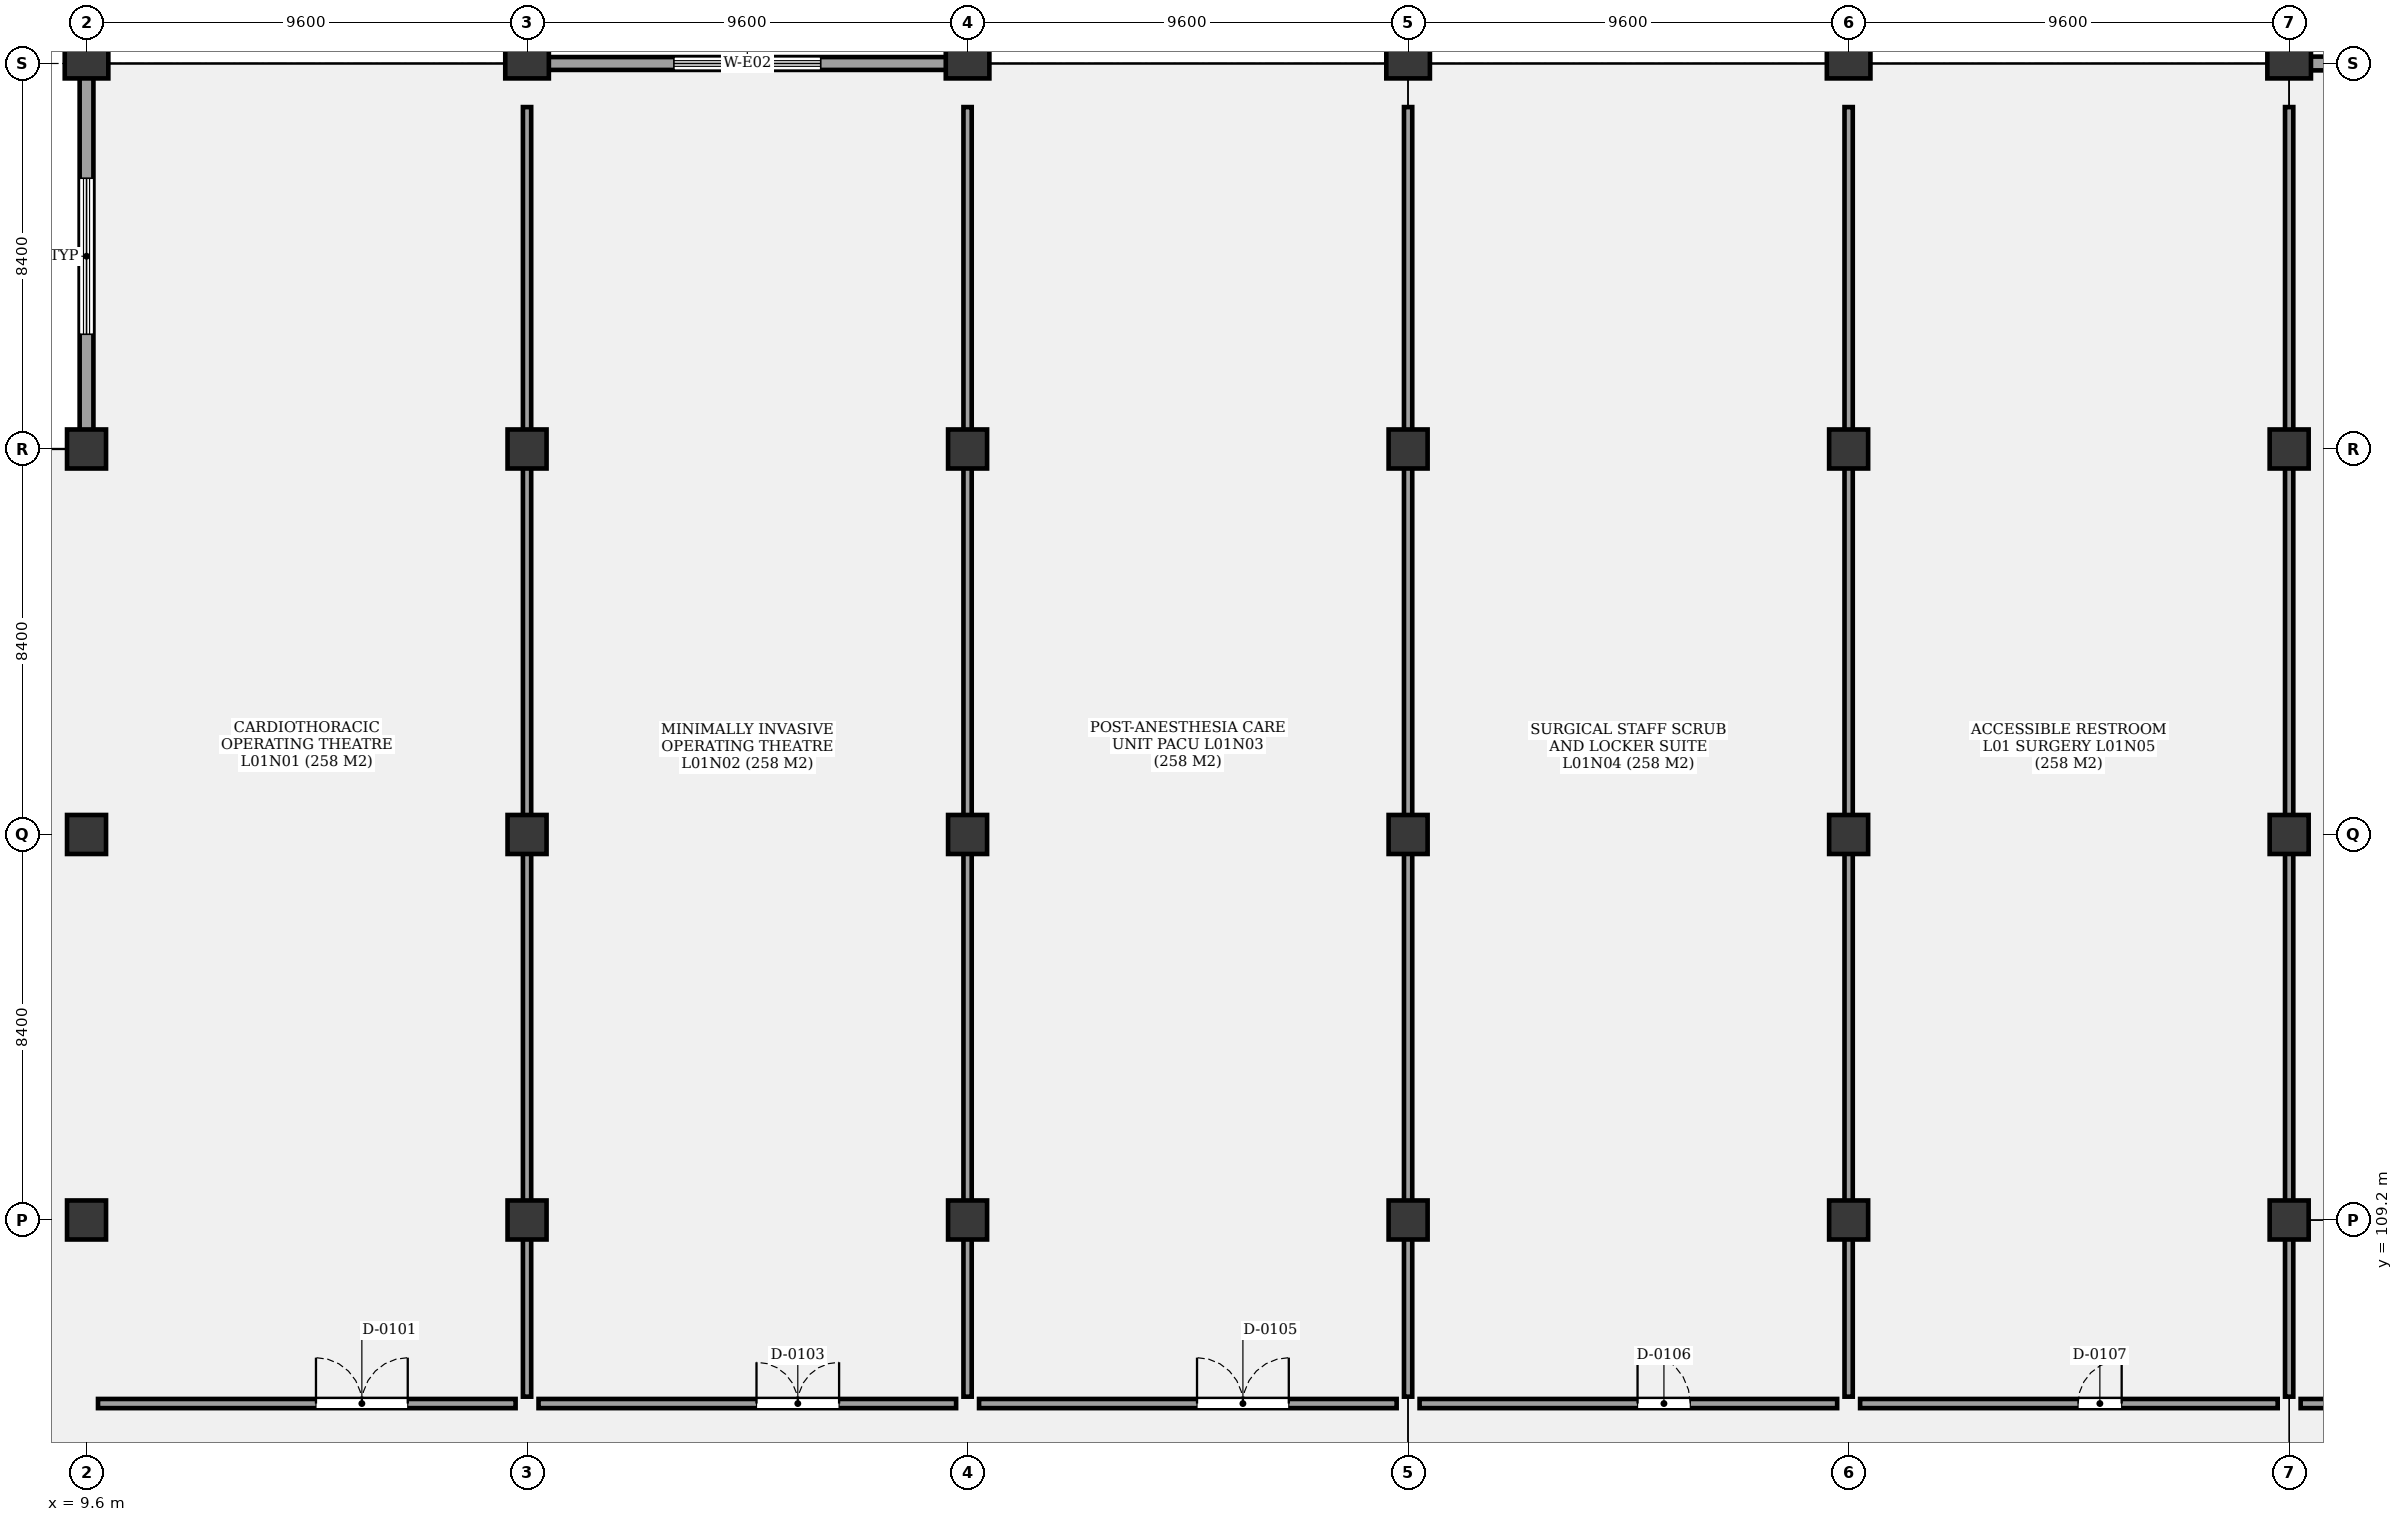
"""IFC4 building model, lengths in metres.
Left out: names, types, materials, properties, quantities, classifications, styles, units other than length and angle.
Written with IfcOpenShell. Run it as: python <this file> out.ifc"""

import sys

from ifc_helpers import new_model, si_unit, direction, frame, frame_2d, origin, origin_2d, place, context, subcontext, project, spatial, rectangle, extrude, element, fill, save


model = new_model("IFC4")
c1 = context("Model", 3, precision=1e-05, world=origin(), true_north=direction((0.0, 1.0)))
c2 = subcontext(c1, "Body", "Model", "MODEL_VIEW")
j1 = project(units=[si_unit("LENGTHUNIT", "METRE"), si_unit("PLANEANGLEUNIT", "RADIAN")], contexts=[c1])
p1 = place(None, origin())
s1 = spatial("IfcSite", under=j1, at=p1, CompositionType="ELEMENT")
p2 = place(p1, origin())
s2 = spatial("IfcBuilding", under=s1, at=p2, CompositionType="ELEMENT")
p3 = place(p2, frame((0.0, 0.0, 5.1)))
s3 = spatial("IfcBuildingStorey", under=s2, at=p3, CompositionType="ELEMENT", Elevation=5.1)
for number, where, z_axis, x_axis in (
    (1, (9.6, 109.2, 0.0), (0.0, 0.0, 1.0), (1.0, 0.0, 0.0)),
    (2, (9.6, 117.6, 0.0), (0.0, 0.0, 1.0), (1.0, 0.0, 0.0)),
    (3, (9.6, 126.0, 0.0), (0.0, 0.0, 1.0), (1.0, 0.0, 0.0)),
):
    element("IfcColumn", number, at=place(p3, frame(where, z_axis=z_axis, x_axis=x_axis)), inside=s3, PredefinedType="COLUMN", context=c2, shape_type="SweptSolid", body=[
        extrude(rectangle(XDim=0.85, YDim=0.85, at=origin_2d()), origin(), (0.0, 0.0, 1.0), 4.8),
    ])
p4 = place(p3, frame((9.6, 134.4, 0.0), z_axis=(0.0, 0.0, 1.0), x_axis=(0.0, 1.0, 0.0)))
e4 = element("IfcColumn", 4, at=p4, inside=s3, PredefinedType="COLUMN", context=c2, shape_type="SweptSolid", body=[
    extrude(rectangle(XDim=0.95, YDim=0.65, at=origin_2d()), origin(), (0.0, 0.0, 1.0), 4.8),
])
for number, where, z_axis, x_axis in (
    (5, (19.2, 109.2, 0.0), (0.0, 0.0, 1.0), (1.0, 0.0, 0.0)),
    (6, (19.2, 117.6, 0.0), (0.0, 0.0, 1.0), (1.0, 0.0, 0.0)),
    (7, (19.2, 126.0, 0.0), (0.0, 0.0, 1.0), (1.0, 0.0, 0.0)),
):
    element("IfcColumn", number, at=place(p3, frame(where, z_axis=z_axis, x_axis=x_axis)), inside=s3, PredefinedType="COLUMN", context=c2, shape_type="SweptSolid", body=[
        extrude(rectangle(XDim=0.85, YDim=0.85, at=origin_2d()), origin(), (0.0, 0.0, 1.0), 4.8),
    ])
p5 = place(p3, frame((19.2, 134.4, 0.0), z_axis=(0.0, 0.0, 1.0), x_axis=(0.0, 1.0, 0.0)))
e8 = element("IfcColumn", 8, at=p5, inside=s3, PredefinedType="COLUMN", context=c2, shape_type="SweptSolid", body=[
    extrude(rectangle(XDim=0.95, YDim=0.65, at=origin_2d()), origin(), (0.0, 0.0, 1.0), 4.8),
])
for number, where, z_axis, x_axis in (
    (9, (28.8, 109.2, 0.0), (0.0, 0.0, 1.0), (1.0, 0.0, 0.0)),
    (10, (28.8, 117.6, 0.0), (0.0, 0.0, 1.0), (1.0, 0.0, 0.0)),
    (11, (28.8, 126.0, 0.0), (0.0, 0.0, 1.0), (1.0, 0.0, 0.0)),
):
    element("IfcColumn", number, at=place(p3, frame(where, z_axis=z_axis, x_axis=x_axis)), inside=s3, PredefinedType="COLUMN", context=c2, shape_type="SweptSolid", body=[
        extrude(rectangle(XDim=0.85, YDim=0.85, at=origin_2d()), origin(), (0.0, 0.0, 1.0), 4.8),
    ])
p6 = place(p3, frame((28.8, 134.4, 0.0), z_axis=(0.0, 0.0, 1.0), x_axis=(0.0, 1.0, 0.0)))
e12 = element("IfcColumn", 12, at=p6, inside=s3, PredefinedType="COLUMN", context=c2, shape_type="SweptSolid", body=[
    extrude(rectangle(XDim=0.95, YDim=0.65, at=origin_2d()), origin(), (0.0, 0.0, 1.0), 4.8),
])
for number, where, z_axis, x_axis in (
    (13, (38.4, 109.2, 0.0), (0.0, 0.0, 1.0), (1.0, 0.0, 0.0)),
    (14, (38.4, 117.6, 0.0), (0.0, 0.0, 1.0), (1.0, 0.0, 0.0)),
    (15, (38.4, 126.0, 0.0), (0.0, 0.0, 1.0), (1.0, 0.0, 0.0)),
):
    element("IfcColumn", number, at=place(p3, frame(where, z_axis=z_axis, x_axis=x_axis)), inside=s3, PredefinedType="COLUMN", context=c2, shape_type="SweptSolid", body=[
        extrude(rectangle(XDim=0.85, YDim=0.85, at=origin_2d()), origin(), (0.0, 0.0, 1.0), 4.8),
    ])
p7 = place(p3, frame((38.4, 134.4, 0.0), z_axis=(0.0, 0.0, 1.0), x_axis=(0.0, 1.0, 0.0)))
e16 = element("IfcColumn", 16, at=p7, inside=s3, PredefinedType="COLUMN", context=c2, shape_type="SweptSolid", body=[
    extrude(rectangle(XDim=0.95, YDim=0.65, at=origin_2d()), origin(), (0.0, 0.0, 1.0), 4.8),
])
for number, where, z_axis, x_axis in (
    (17, (48.0, 109.2, 0.0), (0.0, 0.0, 1.0), (1.0, 0.0, 0.0)),
    (18, (48.0, 117.6, 0.0), (0.0, 0.0, 1.0), (1.0, 0.0, 0.0)),
    (19, (48.0, 126.0, 0.0), (0.0, 0.0, 1.0), (1.0, 0.0, 0.0)),
):
    element("IfcColumn", number, at=place(p3, frame(where, z_axis=z_axis, x_axis=x_axis)), inside=s3, PredefinedType="COLUMN", context=c2, shape_type="SweptSolid", body=[
        extrude(rectangle(XDim=0.85, YDim=0.85, at=origin_2d()), origin(), (0.0, 0.0, 1.0), 4.8),
    ])
p8 = place(p3, frame((48.0, 134.4, 0.0), z_axis=(0.0, 0.0, 1.0), x_axis=(0.0, 1.0, 0.0)))
e20 = element("IfcColumn", 20, at=p8, inside=s3, PredefinedType="COLUMN", context=c2, shape_type="SweptSolid", body=[
    extrude(rectangle(XDim=0.95, YDim=0.65, at=origin_2d()), origin(), (0.0, 0.0, 1.0), 4.8),
])
for number, where, z_axis, x_axis in (
    (21, (57.6, 109.2, 0.0), (0.0, 0.0, 1.0), (1.0, 0.0, 0.0)),
    (22, (57.6, 117.6, 0.0), (0.0, 0.0, 1.0), (1.0, 0.0, 0.0)),
    (23, (57.6, 126.0, 0.0), (0.0, 0.0, 1.0), (1.0, 0.0, 0.0)),
):
    element("IfcColumn", number, at=place(p3, frame(where, z_axis=z_axis, x_axis=x_axis)), inside=s3, PredefinedType="COLUMN", context=c2, shape_type="SweptSolid", body=[
        extrude(rectangle(XDim=0.85, YDim=0.85, at=origin_2d()), origin(), (0.0, 0.0, 1.0), 4.8),
    ])
p9 = place(p3, frame((57.6, 134.4, 0.0), z_axis=(0.0, 0.0, 1.0), x_axis=(0.0, 1.0, 0.0)))
e24 = element("IfcColumn", 24, at=p9, inside=s3, PredefinedType="COLUMN", context=c2, shape_type="SweptSolid", body=[
    extrude(rectangle(XDim=0.95, YDim=0.65, at=origin_2d()), origin(), (0.0, 0.0, 1.0), 4.8),
])
p10 = place(p3, frame((19.2, 134.4, 0.0), z_axis=(0.0, 0.0, 1.0), x_axis=(1.0, 0.0, 0.0)))
e25 = element("IfcWall", 25, at=p10, inside=s3, PredefinedType="SOLIDWALL", context=c2, shape_type="SweptSolid", body=[
    extrude(rectangle(XDim=9.6, YDim=0.28, at=frame_2d((4.8, 0.0))), origin(), (0.0, 0.0, 1.0), 3.94),
])
p11 = place(p10, frame((3.2, 0.0, 0.85)))
e26 = element("IfcOpeningElement", 26, at=p11, cuts=e25, PredefinedType="OPENING", context=c2, shape_type="SweptSolid", body=[
    extrude(rectangle(XDim=3.2, YDim=1.2, at=frame_2d((1.6, 0.6))), frame((0.0, 0.15, 0.0), z_axis=(0.0, -1.0, 0.0), x_axis=(1.0, 0.0, 0.0)), (0.0, 0.0, 1.0), 0.3),
])
p12 = place(p3, frame((57.6, 134.4, 0.0), z_axis=(0.0, 0.0, 1.0), x_axis=(1.0, 0.0, 0.0)))
e27 = element("IfcWall", 27, at=p12, inside=s3, PredefinedType="SOLIDWALL", context=c2, shape_type="SweptSolid", body=[
    extrude(rectangle(XDim=9.6, YDim=0.3, at=frame_2d((4.8, 0.0))), origin(), (0.0, 0.0, 1.0), 3.94),
])
p13 = place(p12, frame((3.1, 0.0, 0.85)))
e28 = element("IfcOpeningElement", 28, at=p13, cuts=e27, PredefinedType="OPENING", context=c2, shape_type="SweptSolid", body=[
    extrude(rectangle(XDim=3.4, YDim=1.2, at=frame_2d((1.7, 0.6))), frame((0.0, 0.16, 0.0), z_axis=(0.0, -1.0, 0.0), x_axis=(1.0, 0.0, 0.0)), (0.0, 0.0, 1.0), 0.32),
])
p14 = place(p3, frame((9.6, 126.16, 0.0), z_axis=(0.0, 0.0, 1.0), x_axis=(0.0, 1.0, 0.0)))
e29 = element("IfcWall", 29, at=p14, inside=s3, PredefinedType="SOLIDWALL", context=c2, shape_type="SweptSolid", body=[
    extrude(rectangle(XDim=8.08, YDim=0.3, at=frame_2d((4.04, 0.0))), origin(), (0.0, 0.0, 1.0), 3.94),
])
p15 = place(p14, frame((2.34, 0.0, 0.85)))
e30 = element("IfcOpeningElement", 30, at=p15, cuts=e29, PredefinedType="OPENING", context=c2, shape_type="SweptSolid", body=[
    extrude(rectangle(XDim=3.4, YDim=1.4, at=frame_2d((1.7, 0.7))), frame((0.0, 0.16, 0.0), z_axis=(0.0, -1.0, 0.0), x_axis=(1.0, 0.0, 0.0)), (0.0, 0.0, 1.0), 0.32),
])
p16 = place(p3, frame((9.85, 105.2, 0.0), z_axis=(0.0, 0.0, 1.0), x_axis=(1.0, 0.0, 0.0)))
e31 = element("IfcWall", 31, at=p16, inside=s3, PredefinedType="PARTITIONING", context=c2, shape_type="SweptSolid", body=[
    extrude(rectangle(XDim=9.1, YDim=0.2, at=frame_2d((4.55, 0.0))), origin(), (0.0, 0.0, 1.0), 3.68),
])
p17 = place(p16, frame((4.75, 0.0, 0.0)))
e32 = element("IfcOpeningElement", 32, at=p17, cuts=e31, PredefinedType="OPENING", context=c2, shape_type="SweptSolid", body=[
    extrude(rectangle(XDim=2.0, YDim=2.4, at=frame_2d((1.0, 1.2))), frame((0.0, 0.11, 0.0), z_axis=(0.0, -1.0, 0.0), x_axis=(1.0, 0.0, 0.0)), (0.0, 0.0, 1.0), 0.22),
])
p18 = place(p3, frame((19.45, 105.2, 0.0), z_axis=(0.0, 0.0, 1.0), x_axis=(1.0, 0.0, 0.0)))
e33 = element("IfcWall", 33, at=p18, inside=s3, PredefinedType="PARTITIONING", context=c2, shape_type="SweptSolid", body=[
    extrude(rectangle(XDim=9.1, YDim=0.2, at=frame_2d((4.55, 0.0))), origin(), (0.0, 0.0, 1.0), 3.68),
])
p19 = place(p18, frame((4.75, 0.0, 0.0)))
e34 = element("IfcOpeningElement", 34, at=p19, cuts=e33, PredefinedType="OPENING", context=c2, shape_type="SweptSolid", body=[
    extrude(rectangle(XDim=1.8, YDim=2.4, at=frame_2d((0.9, 1.2))), frame((0.0, 0.11, 0.0), z_axis=(0.0, -1.0, 0.0), x_axis=(1.0, 0.0, 0.0)), (0.0, 0.0, 1.0), 0.22),
])
p20 = place(p3, frame((19.2, 105.35, 0.0), z_axis=(0.0, 0.0, 1.0), x_axis=(0.0, 1.0, 0.0)))
e35 = element("IfcWall", 35, at=p20, inside=s3, PredefinedType="PARTITIONING", context=c2, shape_type="SweptSolid", body=[
    extrude(rectangle(XDim=28.1, YDim=0.18, at=frame_2d((14.05, 0.0))), origin(), (0.0, 0.0, 1.0), 3.68),
])
p21 = place(p3, frame((29.05, 105.2, 0.0), z_axis=(0.0, 0.0, 1.0), x_axis=(1.0, 0.0, 0.0)))
e36 = element("IfcWall", 36, at=p21, inside=s3, PredefinedType="PARTITIONING", context=c2, shape_type="SweptSolid", body=[
    extrude(rectangle(XDim=9.1, YDim=0.2, at=frame_2d((4.55, 0.0))), origin(), (0.0, 0.0, 1.0), 3.68),
])
p22 = place(p21, frame((4.75, 0.0, 0.0)))
e37 = element("IfcOpeningElement", 37, at=p22, cuts=e36, PredefinedType="OPENING", context=c2, shape_type="SweptSolid", body=[
    extrude(rectangle(XDim=2.0, YDim=2.4, at=frame_2d((1.0, 1.2))), frame((0.0, 0.11, 0.0), z_axis=(0.0, -1.0, 0.0), x_axis=(1.0, 0.0, 0.0)), (0.0, 0.0, 1.0), 0.22),
])
p23 = place(p3, frame((28.8, 105.35, 0.0), z_axis=(0.0, 0.0, 1.0), x_axis=(0.0, 1.0, 0.0)))
e38 = element("IfcWall", 38, at=p23, inside=s3, PredefinedType="PARTITIONING", context=c2, shape_type="SweptSolid", body=[
    extrude(rectangle(XDim=28.1, YDim=0.18, at=frame_2d((14.05, 0.0))), origin(), (0.0, 0.0, 1.0), 3.68),
])
p24 = place(p3, frame((38.65, 105.2, 0.0), z_axis=(0.0, 0.0, 1.0), x_axis=(1.0, 0.0, 0.0)))
e39 = element("IfcWall", 39, at=p24, inside=s3, PredefinedType="PARTITIONING", context=c2, shape_type="SweptSolid", body=[
    extrude(rectangle(XDim=9.1, YDim=0.2, at=frame_2d((4.55, 0.0))), origin(), (0.0, 0.0, 1.0), 3.68),
])
p25 = place(p24, frame((4.75, 0.0, 0.0)))
e40 = element("IfcOpeningElement", 40, at=p25, cuts=e39, PredefinedType="OPENING", context=c2, shape_type="SweptSolid", body=[
    extrude(rectangle(XDim=1.15, YDim=2.2, at=frame_2d((0.575, 1.1))), frame((0.0, 0.11, 0.0), z_axis=(0.0, -1.0, 0.0), x_axis=(1.0, 0.0, 0.0)), (0.0, 0.0, 1.0), 0.22),
])
p26 = place(p3, frame((38.4, 105.35, 0.0), z_axis=(0.0, 0.0, 1.0), x_axis=(0.0, 1.0, 0.0)))
e41 = element("IfcWall", 41, at=p26, inside=s3, PredefinedType="PARTITIONING", context=c2, shape_type="SweptSolid", body=[
    extrude(rectangle(XDim=28.1, YDim=0.18, at=frame_2d((14.05, 0.0))), origin(), (0.0, 0.0, 1.0), 3.68),
])
p27 = place(p3, frame((48.25, 105.2, 0.0), z_axis=(0.0, 0.0, 1.0), x_axis=(1.0, 0.0, 0.0)))
e42 = element("IfcWall", 42, at=p27, inside=s3, PredefinedType="PARTITIONING", context=c2, shape_type="SweptSolid", body=[
    extrude(rectangle(XDim=9.1, YDim=0.2, at=frame_2d((4.55, 0.0))), origin(), (0.0, 0.0, 1.0), 3.68),
])
p28 = place(p27, frame((4.75, 0.0, 0.0)))
e43 = element("IfcOpeningElement", 43, at=p28, cuts=e42, PredefinedType="OPENING", context=c2, shape_type="SweptSolid", body=[
    extrude(rectangle(XDim=0.95, YDim=2.1, at=frame_2d((0.475, 1.05))), frame((0.0, 0.11, 0.0), z_axis=(0.0, -1.0, 0.0), x_axis=(1.0, 0.0, 0.0)), (0.0, 0.0, 1.0), 0.22),
])
p29 = place(p3, frame((48.0, 105.35, 0.0), z_axis=(0.0, 0.0, 1.0), x_axis=(0.0, 1.0, 0.0)))
e44 = element("IfcWall", 44, at=p29, inside=s3, PredefinedType="PARTITIONING", context=c2, shape_type="SweptSolid", body=[
    extrude(rectangle(XDim=28.1, YDim=0.18, at=frame_2d((14.05, 0.0))), origin(), (0.0, 0.0, 1.0), 3.68),
])
p30 = place(p3, frame((57.85, 105.2, 0.0), z_axis=(0.0, 0.0, 1.0), x_axis=(1.0, 0.0, 0.0)))
e45 = element("IfcWall", 45, at=p30, inside=s3, PredefinedType="PARTITIONING", context=c2, shape_type="SweptSolid", body=[
    extrude(rectangle(XDim=9.1, YDim=0.2, at=frame_2d((4.55, 0.0))), origin(), (0.0, 0.0, 1.0), 3.68),
])
p31 = place(p30, frame((4.75, 0.0, 0.0)))
e46 = element("IfcOpeningElement", 46, at=p31, cuts=e45, PredefinedType="OPENING", context=c2, shape_type="SweptSolid", body=[
    extrude(rectangle(XDim=2.0, YDim=2.4, at=frame_2d((1.0, 1.2))), frame((0.0, 0.11, 0.0), z_axis=(0.0, -1.0, 0.0), x_axis=(1.0, 0.0, 0.0)), (0.0, 0.0, 1.0), 0.22),
])
p32 = place(p3, frame((57.6, 105.35, 0.0), z_axis=(0.0, 0.0, 1.0), x_axis=(0.0, 1.0, 0.0)))
e47 = element("IfcWall", 47, at=p32, inside=s3, PredefinedType="PARTITIONING", context=c2, shape_type="SweptSolid", body=[
    extrude(rectangle(XDim=28.1, YDim=0.18, at=frame_2d((14.05, 0.0))), origin(), (0.0, 0.0, 1.0), 3.68),
])
p33 = place(p11, origin())
e48 = element("IfcWindow", 48, at=p33, inside=s3, PartitioningType="SINGLE_PANEL", PredefinedType="WINDOW", context=c2, shape_type="SweptSolid", body=[
    extrude(rectangle(XDim=3.2, YDim=1.2, at=frame_2d((1.6, 0.6))), frame((0.0, 0.03, 0.0), z_axis=(0.0, -1.0, 0.0), x_axis=(1.0, 0.0, 0.0)), (0.0, 0.0, 1.0), 0.06),
])
fill(e26, e48)
p34 = place(p15, origin())
e49 = element("IfcWindow", 49, at=p34, inside=s3, PartitioningType="SINGLE_PANEL", PredefinedType="WINDOW", context=c2, shape_type="SweptSolid", body=[
    extrude(rectangle(XDim=3.4, YDim=1.4, at=frame_2d((1.7, 0.7))), frame((0.0, 0.03, 0.0), z_axis=(0.0, -1.0, 0.0), x_axis=(1.0, 0.0, 0.0)), (0.0, 0.0, 1.0), 0.06),
])
fill(e30, e49)
p35 = place(p17, origin())
e50 = element("IfcDoor", 50, at=p35, inside=s3, OperationType="DOUBLE_DOOR_SINGLE_SWING", PredefinedType="DOOR", context=c2, shape_type="SweptSolid", body=[
    extrude(rectangle(XDim=2.0, YDim=2.4, at=frame_2d((1.0, 1.2))), frame((0.0, 0.025, 0.0), z_axis=(0.0, -1.0, 0.0), x_axis=(1.0, 0.0, 0.0)), (0.0, 0.0, 1.0), 0.05),
])
fill(e32, e50)
p36 = place(p19, origin())
e51 = element("IfcDoor", 51, at=p36, inside=s3, OperationType="DOUBLE_DOOR_SINGLE_SWING", PredefinedType="DOOR", context=c2, shape_type="SweptSolid", body=[
    extrude(rectangle(XDim=1.8, YDim=2.4, at=frame_2d((0.9, 1.2))), frame((0.0, 0.025, 0.0), z_axis=(0.0, -1.0, 0.0), x_axis=(1.0, 0.0, 0.0)), (0.0, 0.0, 1.0), 0.05),
])
fill(e34, e51)
p37 = place(p22, origin())
e52 = element("IfcDoor", 52, at=p37, inside=s3, OperationType="DOUBLE_DOOR_SINGLE_SWING", PredefinedType="DOOR", context=c2, shape_type="SweptSolid", body=[
    extrude(rectangle(XDim=2.0, YDim=2.4, at=frame_2d((1.0, 1.2))), frame((0.0, 0.025, 0.0), z_axis=(0.0, -1.0, 0.0), x_axis=(1.0, 0.0, 0.0)), (0.0, 0.0, 1.0), 0.05),
])
fill(e37, e52)
p38 = place(p25, origin())
e53 = element("IfcDoor", 53, at=p38, inside=s3, OperationType="SINGLE_SWING_LEFT", PredefinedType="DOOR", context=c2, shape_type="SweptSolid", body=[
    extrude(rectangle(XDim=1.15, YDim=2.2, at=frame_2d((0.575, 1.1))), frame((0.0, 0.025, 0.0), z_axis=(0.0, -1.0, 0.0), x_axis=(1.0, 0.0, 0.0)), (0.0, 0.0, 1.0), 0.05),
])
fill(e40, e53)
p39 = place(p28, origin())
e54 = element("IfcDoor", 54, at=p39, inside=s3, OperationType="SINGLE_SWING_RIGHT", PredefinedType="DOOR", context=c2, shape_type="SweptSolid", body=[
    extrude(rectangle(XDim=0.95, YDim=2.1, at=frame_2d((0.475, 1.05))), frame((0.0, 0.025, 0.0), z_axis=(0.0, -1.0, 0.0), x_axis=(1.0, 0.0, 0.0)), (0.0, 0.0, 1.0), 0.05),
])
fill(e43, e54)
save(model, sys.argv[1])
